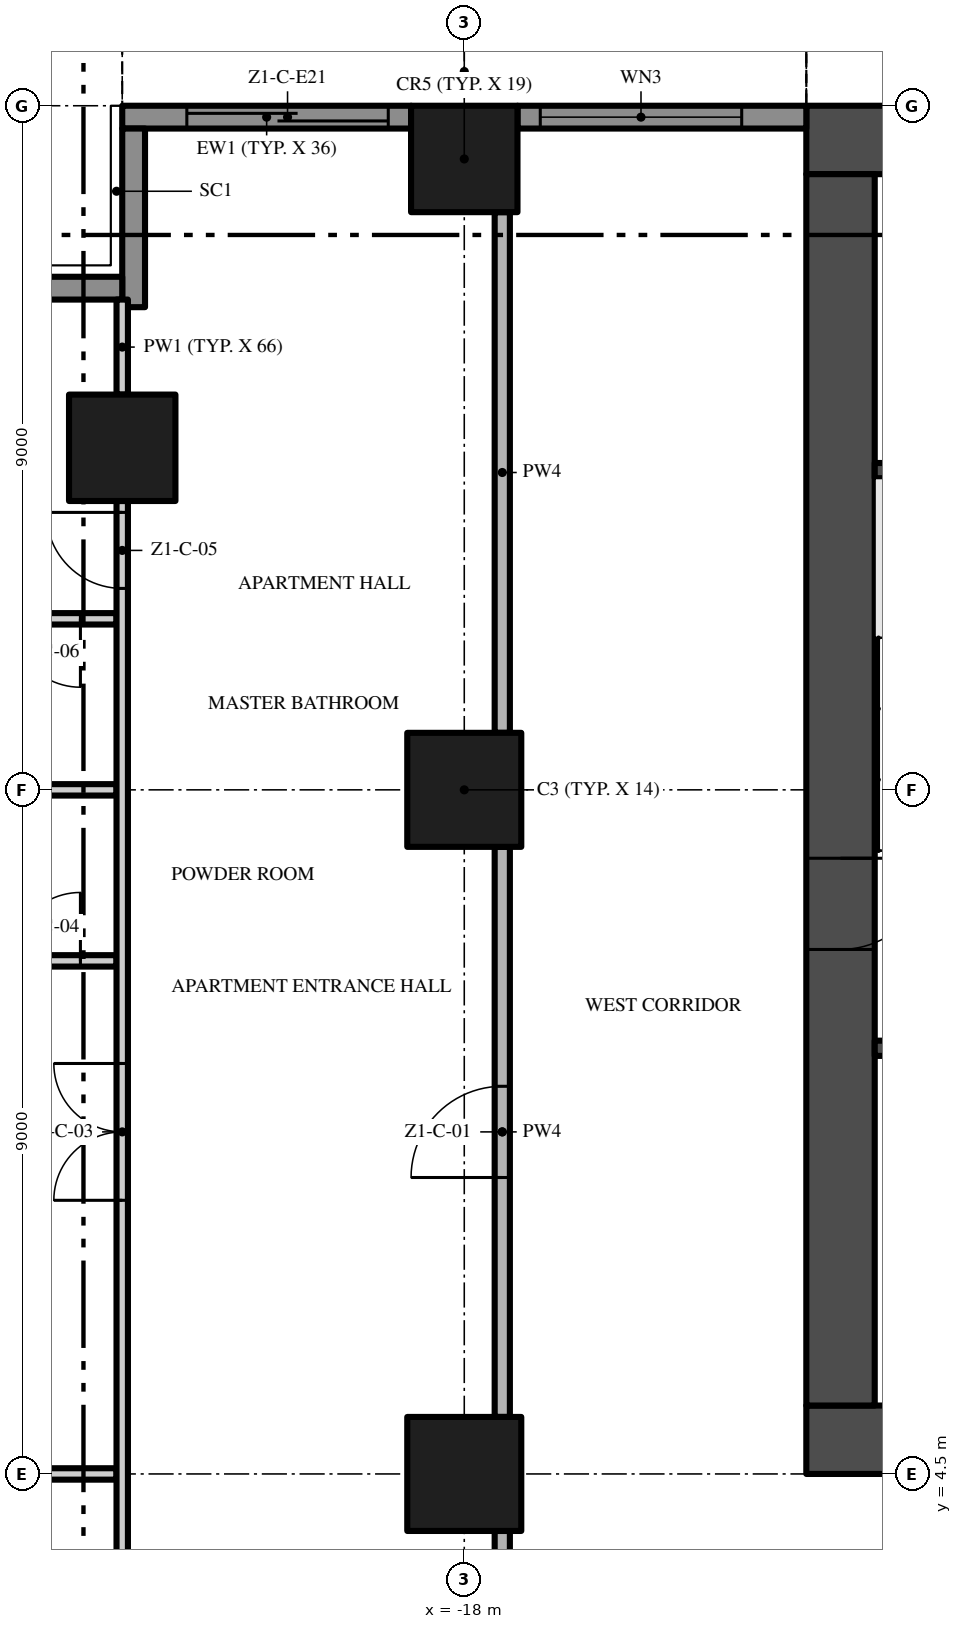
"""IFC4 building model, lengths in metres.
Left out: names, types, materials, properties, quantities, classifications, styles, units other than length and angle.
Written with IfcOpenShell. Run it as: python <this file> out.ifc"""

import sys

from ifc_helpers import new_model, si_unit, direction, frame, frame_2d, origin, origin_2d, place, context, subcontext, project, spatial, rectangle, extrude, element, fill, save


model = new_model("IFC4")
c1 = context("Model", 3, precision=1e-05, world=origin(), true_north=direction((0.0, 1.0)))
c2 = subcontext(c1, "Body", "Model", "MODEL_VIEW")
j1 = project(units=[si_unit("LENGTHUNIT", "METRE"), si_unit("PLANEANGLEUNIT", "RADIAN")], contexts=[c1])
p1 = place(None, origin())
s1 = spatial("IfcSite", under=j1, at=p1, CompositionType="ELEMENT")
p2 = place(p1, origin())
s2 = spatial("IfcBuilding", under=s1, at=p2, CompositionType="ELEMENT")
p3 = place(p2, frame((0.0, 0.0, 41.6)))
s3 = spatial("IfcBuildingStorey", under=s2, at=p3, CompositionType="ELEMENT", Elevation=41.6)
p4 = place(p3, frame((-13.5, 4.95, -0.3), z_axis=(0.0, 0.0, 1.0), x_axis=(1.0, 0.0, 0.0)))
e1 = element("IfcWall", 1, at=p4, inside=s3, PredefinedType="SHEAR", context=c2, shape_type="SweptSolid", body=[
    extrude(rectangle(XDim=27.0, YDim=0.9, at=frame_2d((13.5, 0.0))), origin(), (0.0, 0.0, 1.0), 3.8),
])
p5 = place(p4, frame((12.0, 0.0, 0.3)))
e2 = element("IfcOpeningElement", 2, at=p5, cuts=e1, PredefinedType="OPENING", context=c2, shape_type="SweptSolid", body=[
    extrude(rectangle(XDim=3.0, YDim=2.4, at=frame_2d((1.5, 1.2))), frame((0.0, 0.46, 0.0), z_axis=(0.0, -1.0, 0.0), x_axis=(1.0, 0.0, 0.0)), (0.0, 0.0, 1.0), 0.92),
])
p6 = place(p4, frame((4.9, 0.0, 0.3)))
e3 = element("IfcOpeningElement", 3, at=p6, cuts=e1, PredefinedType="OPENING", context=c2, shape_type="SweptSolid", body=[
    extrude(rectangle(XDim=1.2, YDim=2.2, at=frame_2d((0.6, 1.1))), frame((0.0, 0.46, 0.0), z_axis=(0.0, -1.0, 0.0), x_axis=(1.0, 0.0, 0.0)), (0.0, 0.0, 1.0), 0.92),
])
p7 = place(p4, frame((20.75, 0.0, 0.3)))
e4 = element("IfcOpeningElement", 4, at=p7, cuts=e1, PredefinedType="OPENING", context=c2, shape_type="SweptSolid", body=[
    extrude(rectangle(XDim=1.5, YDim=2.2, at=frame_2d((0.75, 1.1))), frame((0.0, 0.46, 0.0), z_axis=(0.0, -1.0, 0.0), x_axis=(1.0, 0.0, 0.0)), (0.0, 0.0, 1.0), 0.92),
])
p8 = place(p4, frame((17.4, 0.0, 0.3)))
e5 = element("IfcOpeningElement", 5, at=p8, cuts=e1, PredefinedType="OPENING", context=c2, shape_type="SweptSolid", body=[
    extrude(rectangle(XDim=1.2, YDim=2.2, at=frame_2d((0.6, 1.1))), frame((0.0, 0.46, 0.0), z_axis=(0.0, -1.0, 0.0), x_axis=(1.0, 0.0, 0.0)), (0.0, 0.0, 1.0), 0.92),
])
p9 = place(p3, frame((13.5, 22.05, -0.3), z_axis=(0.0, 0.0, 1.0), x_axis=(-1.0, 0.0, 0.0)))
e6 = element("IfcWall", 6, at=p9, inside=s3, PredefinedType="SHEAR", context=c2, shape_type="SweptSolid", body=[
    extrude(rectangle(XDim=27.0, YDim=0.9, at=frame_2d((13.5, 0.0))), origin(), (0.0, 0.0, 1.0), 3.8),
])
p10 = place(p3, frame((-13.05, 21.6, -0.3), z_axis=(0.0, 0.0, 1.0), x_axis=(0.0, -1.0, 0.0)))
e7 = element("IfcWall", 7, at=p10, inside=s3, PredefinedType="SHEAR", context=c2, shape_type="SweptSolid", body=[
    extrude(rectangle(XDim=16.2, YDim=0.9, at=frame_2d((8.1, 0.0))), origin(), (0.0, 0.0, 1.0), 3.8),
])
p11 = place(p10, frame((9.0, 0.0, 0.3)))
e8 = element("IfcOpeningElement", 8, at=p11, cuts=e7, PredefinedType="OPENING", context=c2, shape_type="SweptSolid", body=[
    extrude(rectangle(XDim=1.2, YDim=2.2, at=frame_2d((0.6, 1.1))), frame((0.0, 0.46, 0.0), z_axis=(0.0, -1.0, 0.0), x_axis=(1.0, 0.0, 0.0)), (0.0, 0.0, 1.0), 0.92),
])
p12 = place(p3, frame((-18.0, 13.5, 0.0), z_axis=(0.0, 0.0, 1.0), x_axis=(1.0, 0.0, 0.0)))
e9 = element("IfcColumn", 9, at=p12, inside=s3, PredefinedType="COLUMN", context=c2, shape_type="SweptSolid", body=[
    extrude(rectangle(XDim=1.5, YDim=1.5, at=origin_2d()), origin(), (0.0, 0.0, 1.0), 3.5),
])
p13 = place(p3, frame((-18.0, 21.8, 0.0), z_axis=(0.0, 0.0, 1.0), x_axis=(1.0, 0.0, 0.0)))
e10 = element("IfcColumn", 10, at=p13, inside=s3, PredefinedType="COLUMN", context=c2, shape_type="SweptSolid", body=[
    extrude(rectangle(XDim=1.4, YDim=1.4, at=origin_2d()), origin(), (0.0, 0.0, 1.0), 3.5),
])
p14 = place(p3, frame((-18.0, 4.5, 0.0), z_axis=(0.0, 0.0, 1.0), x_axis=(1.0, 0.0, 0.0)))
e11 = element("IfcColumn", 11, at=p14, inside=s3, PredefinedType="COLUMN", context=c2, shape_type="SweptSolid", body=[
    extrude(rectangle(XDim=1.5, YDim=1.5, at=origin_2d()), origin(), (0.0, 0.0, 1.0), 3.5),
])
p15 = place(p3, frame((-22.5, 18.0, 0.0), z_axis=(0.0, 0.0, 1.0), x_axis=(1.0, 0.0, 0.0)))
e12 = element("IfcColumn", 12, at=p15, inside=s3, PredefinedType="COLUMN", context=c2, shape_type="SweptSolid", body=[
    extrude(rectangle(XDim=1.4, YDim=1.4, at=origin_2d()), origin(), (0.0, 0.0, 1.0), 3.5),
])
p16 = place(p3, frame((-17.3, 22.35, 0.0), z_axis=(0.0, 0.0, 1.0), x_axis=(1.0, 0.0, 0.0)))
e13 = element("IfcWall", 13, at=p16, inside=s3, PredefinedType="SOLIDWALL", context=c2, shape_type="SweptSolid", body=[
    extrude(rectangle(XDim=3.8, YDim=0.3, at=frame_2d((1.9, 0.0))), origin(), (0.0, 0.0, 1.0), 3.5),
])
p17 = place(p16, frame((0.3, 0.0, 0.45)))
e14 = element("IfcOpeningElement", 14, at=p17, cuts=e13, PredefinedType="OPENING", context=c2, shape_type="SweptSolid", body=[
    extrude(rectangle(XDim=2.65, YDim=2.65, at=frame_2d((1.325, 1.325))), frame((0.0, 0.16, 0.0), z_axis=(0.0, -1.0, 0.0), x_axis=(1.0, 0.0, 0.0)), (0.0, 0.0, 1.0), 0.32),
])
p18 = place(p3, frame((-22.5, 22.35, 0.0), z_axis=(0.0, 0.0, 1.0), x_axis=(1.0, 0.0, 0.0)))
e15 = element("IfcWall", 15, at=p18, inside=s3, PredefinedType="SOLIDWALL", context=c2, shape_type="SweptSolid", body=[
    extrude(rectangle(XDim=3.8, YDim=0.3, at=frame_2d((1.9, 0.0))), origin(), (0.0, 0.0, 1.0), 3.5),
])
p19 = place(p18, frame((0.85, 0.0, 0.0)))
e16 = element("IfcOpeningElement", 16, at=p19, cuts=e15, PredefinedType="OPENING", context=c2, shape_type="SweptSolid", body=[
    extrude(rectangle(XDim=2.65, YDim=2.4, at=frame_2d((1.325, 1.2))), frame((0.0, 0.16, 0.0), z_axis=(0.0, -1.0, 0.0), x_axis=(1.0, 0.0, 0.0)), (0.0, 0.0, 1.0), 0.32),
])
p20 = place(p3, frame((-22.35, 19.85, 0.0), z_axis=(0.0, 0.0, 1.0), x_axis=(0.0, 1.0, 0.0)))
e17 = element("IfcWall", 17, at=p20, inside=s3, PredefinedType="SOLIDWALL", context=c2, shape_type="SweptSolid", body=[
    extrude(rectangle(XDim=2.35, YDim=0.3, at=frame_2d((1.175, 0.0))), origin(), (0.0, 0.0, 1.0), 3.5),
])
p21 = place(p3, frame((-24.75, 20.1, 0.0), z_axis=(0.0, 0.0, 1.0), x_axis=(1.0, 0.0, 0.0)))
e18 = element("IfcWall", 18, at=p21, inside=s3, PredefinedType="SOLIDWALL", context=c2, shape_type="SweptSolid", body=[
    extrude(rectangle(XDim=2.25, YDim=0.3, at=frame_2d((1.125, 0.0))), origin(), (0.0, 0.0, 1.0), 3.5),
])
for number, where, z_axis, x_axis in (
    (19, (-12.6, 10.1, 0.0), (0.0, 0.0, 1.0), (1.0, 0.0, 0.0)),
    (20, (-12.6, 17.7, 0.0), (0.0, 0.0, 1.0), (1.0, 0.0, 0.0)),
):
    element("IfcWall", number, at=place(p3, frame(where, z_axis=z_axis, x_axis=x_axis)), inside=s3, PredefinedType="SHEAR", context=c2, shape_type="SweptSolid", body=[
        extrude(rectangle(XDim=2.95, YDim=0.2, at=frame_2d((1.475, 0.0))), origin(), (0.0, 0.0, 1.0), 3.5),
    ])
p22 = place(p3, frame((-25.6, 4.5, 0.0), z_axis=(0.0, 0.0, 1.0), x_axis=(1.0, 0.0, 0.0)))
e21 = element("IfcWall", 21, at=p22, inside=s3, PredefinedType="PARTITIONING", context=c2, shape_type="SweptSolid", body=[
    extrude(rectangle(XDim=3.025, YDim=0.15, at=frame_2d((1.512, 0.0))), origin(), (0.0, 0.0, 1.0), 3.5),
])
p23 = place(p3, frame((-24.45, 11.25, 0.0), z_axis=(0.0, 0.0, 1.0), x_axis=(1.0, 0.0, 0.0)))
e22 = element("IfcWall", 22, at=p23, inside=s3, PredefinedType="PARTITIONING", context=c2, shape_type="SweptSolid", body=[
    extrude(rectangle(XDim=1.875, YDim=0.15, at=frame_2d((0.938, 0.0))), origin(), (0.0, 0.0, 1.0), 3.5),
])
p24 = place(p23, frame((0.5, 0.0, 0.0)))
e23 = element("IfcOpeningElement", 23, at=p24, cuts=e22, PredefinedType="OPENING", context=c2, shape_type="SweptSolid", body=[
    extrude(rectangle(XDim=0.9, YDim=2.1, at=frame_2d((0.45, 1.05))), frame((0.0, 0.085, 0.0), z_axis=(0.0, -1.0, 0.0), x_axis=(1.0, 0.0, 0.0)), (0.0, 0.0, 1.0), 0.17),
])
p25 = place(p3, frame((-24.45, 13.5, 0.0), z_axis=(0.0, 0.0, 1.0), x_axis=(1.0, 0.0, 0.0)))
e24 = element("IfcWall", 24, at=p25, inside=s3, PredefinedType="PARTITIONING", context=c2, shape_type="SweptSolid", body=[
    extrude(rectangle(XDim=1.875, YDim=0.15, at=frame_2d((0.938, 0.0))), origin(), (0.0, 0.0, 1.0), 3.5),
])
p26 = place(p3, frame((-22.575, 15.75, 0.0), z_axis=(0.0, 0.0, 1.0), x_axis=(-1.0, 0.0, 0.0)))
e25 = element("IfcWall", 25, at=p26, inside=s3, PredefinedType="PARTITIONING", context=c2, shape_type="SweptSolid", body=[
    extrude(rectangle(XDim=1.875, YDim=0.15, at=frame_2d((0.938, 0.0))), origin(), (0.0, 0.0, 1.0), 3.5),
])
p27 = place(p26, frame((0.475, 0.0, 0.0)))
e26 = element("IfcOpeningElement", 26, at=p27, cuts=e25, PredefinedType="OPENING", context=c2, shape_type="SweptSolid", body=[
    extrude(rectangle(XDim=0.9, YDim=2.1, at=frame_2d((0.45, 1.05))), frame((0.0, 0.085, 0.0), z_axis=(0.0, -1.0, 0.0), x_axis=(1.0, 0.0, 0.0)), (0.0, 0.0, 1.0), 0.17),
])
p28 = place(p3, frame((-22.5, 0.1, 0.0), z_axis=(0.0, 0.0, 1.0), x_axis=(0.0, 1.0, 0.0)))
e27 = element("IfcWall", 27, at=p28, inside=s3, PredefinedType="PARTITIONING", context=c2, shape_type="SweptSolid", body=[
    extrude(rectangle(XDim=17.2, YDim=0.15, at=frame_2d((8.6, 0.0))), origin(), (0.0, 0.0, 1.0), 3.5),
])
p29 = place(p28, frame((1.65, 0.0, 0.0)))
e28 = element("IfcOpeningElement", 28, at=p29, cuts=e27, PredefinedType="OPENING", context=c2, shape_type="SweptSolid", body=[
    extrude(rectangle(XDim=1.0, YDim=2.4, at=frame_2d((0.5, 1.2))), frame((0.0, 0.085, 0.0), z_axis=(0.0, -1.0, 0.0), x_axis=(1.0, 0.0, 0.0)), (0.0, 0.0, 1.0), 0.17),
])
p30 = place(p28, frame((8.0, 0.0, 0.0)))
e29 = element("IfcOpeningElement", 29, at=p30, cuts=e27, PredefinedType="OPENING", context=c2, shape_type="SweptSolid", body=[
    extrude(rectangle(XDim=1.8, YDim=2.4, at=frame_2d((0.9, 1.2))), frame((0.0, 0.085, 0.0), z_axis=(0.0, -1.0, 0.0), x_axis=(1.0, 0.0, 0.0)), (0.0, 0.0, 1.0), 0.17),
])
p31 = place(p28, frame((16.05, 0.0, 0.0)))
e30 = element("IfcOpeningElement", 30, at=p31, cuts=e27, PredefinedType="OPENING", context=c2, shape_type="SweptSolid", body=[
    extrude(rectangle(XDim=1.0, YDim=2.4, at=frame_2d((0.5, 1.2))), frame((0.0, 0.085, 0.0), z_axis=(0.0, -1.0, 0.0), x_axis=(1.0, 0.0, 0.0)), (0.0, 0.0, 1.0), 0.17),
])
p32 = place(p3, frame((-22.5, 18.7, 0.0), z_axis=(0.0, 0.0, 1.0), x_axis=(0.0, 1.0, 0.0)))
e31 = element("IfcWall", 31, at=p32, inside=s3, PredefinedType="PARTITIONING", context=c2, shape_type="SweptSolid", body=[
    extrude(rectangle(XDim=1.25, YDim=0.15, at=frame_2d((0.625, 0.0))), origin(), (0.0, 0.0, 1.0), 3.5),
])
p33 = place(p3, frame((-17.5, -0.2, 0.0), z_axis=(0.0, 0.0, 1.0), x_axis=(0.0, 1.0, 0.0)))
e32 = element("IfcWall", 32, at=p33, inside=s3, PredefinedType="PARTITIONING", context=c2, shape_type="SweptSolid", body=[
    extrude(rectangle(XDim=3.95, YDim=0.2, at=frame_2d((1.975, 0.0))), origin(), (0.0, 0.0, 1.0), 3.5),
])
p34 = place(p3, frame((-17.5, 5.25, 0.0), z_axis=(0.0, 0.0, 1.0), x_axis=(0.0, 1.0, 0.0)))
e33 = element("IfcWall", 33, at=p34, inside=s3, PredefinedType="PARTITIONING", context=c2, shape_type="SweptSolid", body=[
    extrude(rectangle(XDim=7.5, YDim=0.2, at=frame_2d((3.75, 0.0))), origin(), (0.0, 0.0, 1.0), 3.5),
])
p35 = place(p34, frame((3.15, 0.0, 0.0)))
e34 = element("IfcOpeningElement", 34, at=p35, cuts=e33, PredefinedType="OPENING", context=c2, shape_type="SweptSolid", body=[
    extrude(rectangle(XDim=1.2, YDim=2.4, at=frame_2d((0.6, 1.2))), frame((0.0, 0.11, 0.0), z_axis=(0.0, -1.0, 0.0), x_axis=(1.0, 0.0, 0.0)), (0.0, 0.0, 1.0), 0.22),
])
p36 = place(p3, frame((-17.5, 14.25, 0.0), z_axis=(0.0, 0.0, 1.0), x_axis=(0.0, 1.0, 0.0)))
e35 = element("IfcWall", 35, at=p36, inside=s3, PredefinedType="PARTITIONING", context=c2, shape_type="SweptSolid", body=[
    extrude(rectangle(XDim=6.85, YDim=0.2, at=frame_2d((3.425, 0.0))), origin(), (0.0, 0.0, 1.0), 3.5),
])
p37 = place(p17, origin())
e36 = element("IfcWindow", 36, at=p37, inside=s3, PartitioningType="SINGLE_PANEL", PredefinedType="WINDOW", context=c2, shape_type="SweptSolid", body=[
    extrude(rectangle(XDim=2.65, YDim=2.65, at=frame_2d((1.325, 1.325))), frame((0.0, 0.03, 0.0), z_axis=(0.0, -1.0, 0.0), x_axis=(1.0, 0.0, 0.0)), (0.0, 0.0, 1.0), 0.06),
])
fill(e14, e36)
p38 = place(p19, origin())
e37 = element("IfcDoor", 37, at=p38, inside=s3, OperationType="SINGLE_SWING_LEFT", PredefinedType="DOOR", context=c2, shape_type="SweptSolid", body=[
    extrude(rectangle(XDim=2.65, YDim=2.4, at=frame_2d((1.325, 1.2))), frame((0.0, 0.025, 0.0), z_axis=(0.0, -1.0, 0.0), x_axis=(1.0, 0.0, 0.0)), (0.0, 0.0, 1.0), 0.05),
])
fill(e16, e37)
p39 = place(p11, frame((1.2, 0.0, 0.0), z_axis=(0.0, 0.0, 1.0), x_axis=(-1.0, 0.0, 0.0)))
e38 = element("IfcDoor", 38, at=p39, inside=s3, OperationType="SINGLE_SWING_RIGHT", PredefinedType="DOOR", context=c2, shape_type="SweptSolid", body=[
    extrude(rectangle(XDim=1.2, YDim=2.2, at=frame_2d((0.6, 1.1))), frame((0.0, 0.025, 0.0), z_axis=(0.0, -1.0, 0.0), x_axis=(1.0, 0.0, 0.0)), (0.0, 0.0, 1.0), 0.05),
])
fill(e8, e38)
p40 = place(p35, origin())
e39 = element("IfcDoor", 39, at=p40, inside=s3, OperationType="SINGLE_SWING_LEFT", PredefinedType="DOOR", context=c2, shape_type="SweptSolid", body=[
    extrude(rectangle(XDim=1.2, YDim=2.4, at=frame_2d((0.6, 1.2))), frame((0.0, 0.025, 0.0), z_axis=(0.0, -1.0, 0.0), x_axis=(1.0, 0.0, 0.0)), (0.0, 0.0, 1.0), 0.05),
])
fill(e34, e39)
p41 = place(p30, origin())
e40 = element("IfcDoor", 40, at=p41, inside=s3, OperationType="DOUBLE_DOOR_SINGLE_SWING", PredefinedType="DOOR", context=c2, shape_type="SweptSolid", body=[
    extrude(rectangle(XDim=1.8, YDim=2.4, at=frame_2d((0.9, 1.2))), frame((0.0, 0.025, 0.0), z_axis=(0.0, -1.0, 0.0), x_axis=(1.0, 0.0, 0.0)), (0.0, 0.0, 1.0), 0.05),
])
fill(e29, e40)
p42 = place(p24, origin())
e41 = element("IfcDoor", 41, at=p42, inside=s3, OperationType="SINGLE_SWING_RIGHT", PredefinedType="DOOR", context=c2, shape_type="SweptSolid", body=[
    extrude(rectangle(XDim=0.9, YDim=2.1, at=frame_2d((0.45, 1.05))), frame((0.0, 0.025, 0.0), z_axis=(0.0, -1.0, 0.0), x_axis=(1.0, 0.0, 0.0)), (0.0, 0.0, 1.0), 0.05),
])
fill(e23, e41)
p43 = place(p31, origin())
e42 = element("IfcDoor", 42, at=p43, inside=s3, OperationType="SINGLE_SWING_RIGHT", PredefinedType="DOOR", context=c2, shape_type="SweptSolid", body=[
    extrude(rectangle(XDim=1.0, YDim=2.4, at=frame_2d((0.5, 1.2))), frame((0.0, 0.025, 0.0), z_axis=(0.0, -1.0, 0.0), x_axis=(1.0, 0.0, 0.0)), (0.0, 0.0, 1.0), 0.05),
])
fill(e30, e42)
p44 = place(p27, origin())
e43 = element("IfcDoor", 43, at=p44, inside=s3, OperationType="SINGLE_SWING_LEFT", PredefinedType="DOOR", context=c2, shape_type="SweptSolid", body=[
    extrude(rectangle(XDim=0.9, YDim=2.1, at=frame_2d((0.45, 1.05))), frame((0.0, 0.025, 0.0), z_axis=(0.0, -1.0, 0.0), x_axis=(1.0, 0.0, 0.0)), (0.0, 0.0, 1.0), 0.05),
])
fill(e26, e43)
save(model, sys.argv[1])
